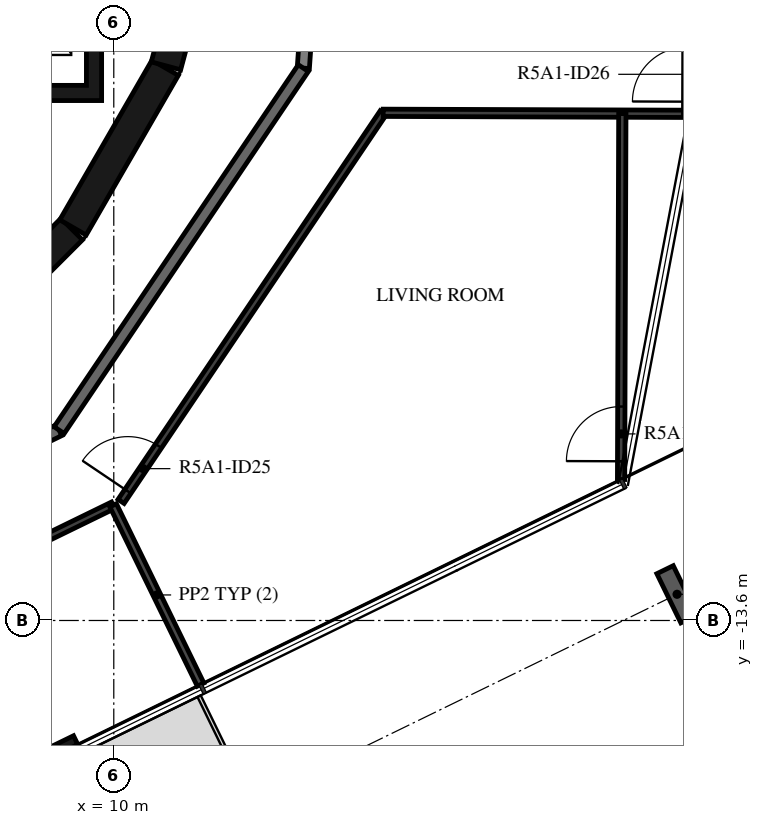
"""IFC4 building model, lengths in metres.
Left out: names, types, materials, properties, quantities, classifications, styles, units other than length and angle.
Written with IfcOpenShell. Run it as: python <this file> out.ifc"""

import sys

from ifc_helpers import new_model, si_unit, direction, frame, frame_2d, origin, origin_2d, place, context, subcontext, project, spatial, polyline, rectangle, i_section, outline, extrude, element, fill, save


model = new_model("IFC4")
c1 = context("Model", 3, precision=1e-05, world=origin(), true_north=direction((0.0, 1.0)))
c2 = subcontext(c1, "Body", "Model", "MODEL_VIEW")
j1 = project(units=[si_unit("LENGTHUNIT", "METRE"), si_unit("PLANEANGLEUNIT", "RADIAN")], contexts=[c1])
p1 = place(None, origin())
s1 = spatial("IfcSite", under=j1, at=p1, CompositionType="ELEMENT")
p2 = place(p1, origin())
s2 = spatial("IfcBuilding", under=s1, at=p2, CompositionType="ELEMENT")
p3 = place(p2, frame((0.0, 0.0, 191.9)))
s3 = spatial("IfcBuildingStorey", under=s2, at=p3, CompositionType="ELEMENT", Elevation=191.9)
p4 = place(p3, frame((19.263, -13.169, -0.38), z_axis=(0.0, 0.0, 1.0), x_axis=(-0.898794095235, -0.438371046456, 0.0)))
e1 = element("IfcColumn", 1, at=p4, inside=s3, PredefinedType="COLUMN", context=c2, shape_type="SweptSolid", body=[
    extrude(i_section(OverallWidth=0.3, OverallDepth=0.9, WebThickness=0.019, FlangeThickness=0.035, FilletRadius=0.03, at=origin_2d()), origin(), (0.0, 0.0, 1.0), 3.5),
])
p5 = place(p3, frame((6.497, -16.97, 0.0), z_axis=(0.0, 0.0, 1.0), x_axis=(0.898778711213, 0.43840258698, 0.0)))
e2 = element("IfcWall", 2, at=p5, inside=s3, PredefinedType="STANDARD", context=c2, shape_type="SweptSolid", body=[
    extrude(rectangle(XDim=3.2, YDim=0.16, at=frame_2d((1.6, 0.0))), origin(), (0.0, 0.0, 1.0), 3.12),
])
p6 = place(p5, frame((0.4, 0.0, 0.0)))
e3 = element("IfcOpeningElement", 3, at=p6, cuts=e2, PredefinedType="OPENING", context=c2, shape_type="SweptSolid", body=[
    extrude(rectangle(XDim=2.4, YDim=2.4, at=frame_2d((1.2, 1.2))), frame((0.0, 0.09, 0.0), z_axis=(0.0, -1.0, 0.0), x_axis=(1.0, 0.0, 0.0)), (0.0, 0.0, 1.0), 0.18),
])
p7 = place(p3, frame((7.164, -9.308, 0.0), z_axis=(0.0, 0.0, 1.0), x_axis=(0.707106781187, 0.707106781187, 0.0)))
e4 = element("IfcWall", 4, at=p7, inside=s3, PredefinedType="SHEAR", context=c2, shape_type="SweptSolid", body=[
    extrude(rectangle(XDim=3.032, YDim=0.5, at=frame_2d((1.516, 0.0))), origin(), (0.0, 0.0, 1.0), 3.12),
])
for number, where, z_axis, x_axis in (
    (5, (9.329, -7.137, 0.0), (0.0, 0.0, 1.0), (0.5, 0.866, 0.0)),
    (6, (10.858, -4.479, 0.0), (0.0, 0.0, 1.0), (0.259, 0.966, 0.0)),
):
    element("IfcWall", number, at=place(p3, frame(where, z_axis=z_axis, x_axis=x_axis)), inside=s3, PredefinedType="SHEAR", context=c2, shape_type="SweptSolid", body=[
        extrude(rectangle(XDim=3.033, YDim=0.5, at=frame_2d((1.516, 0.0))), origin(), (0.0, 0.0, 1.0), 3.12),
    ])
p8 = place(p3, origin())
e7 = element("IfcWall", 7, at=p8, inside=s3, PredefinedType="SHEAR", context=c2, shape_type="SweptSolid", body=[
    extrude(outline(polyline([(9.8, -5.05), (9.8, -4.8), (9.8, -1.9), (9.55, -1.9), (9.55, -4.8), (7.65, -4.8), (7.65, -1.9), (7.4, -1.9), (7.4, -4.8), (5.5, -4.8), (5.5, -1.9), (5.25, -1.9), (5.25, -4.8), (3.35, -4.8), (3.35, -1.9), (3.1, -1.9), (3.1, -4.8), (1.2, -4.8), (1.2, -1.9), (0.95, -1.9), (0.95, -4.8), (-0.95, -4.8), (-0.95, -1.9), (-1.2, -1.9), (-1.2, -4.8), (-3.1, -4.8), (-3.1, -1.9), (-3.35, -1.9), (-3.35, -4.8), (-5.25, -4.8), (-5.25, -1.9), (-5.5, -1.9), (-5.5, -4.8), (-7.4, -4.8), (-7.4, -1.9), (-7.65, -1.9), (-7.65, -4.8), (-9.55, -4.8), (-9.55, -1.9), (-9.8, -1.9), (-9.8, -4.8), (-9.8, -5.05), (9.8, -5.05)])), origin(), (0.0, 0.0, 1.0), 3.12),
])
p9 = place(p3, frame((13.117, -4.517, 0.0), z_axis=(0.0, 0.0, 1.0), x_axis=(0.069736659613, 0.997565435601, 0.0)))
e8 = element("IfcWall", 8, at=p9, inside=s3, PredefinedType="STANDARD", context=c2, shape_type="SweptSolid", body=[
    extrude(rectangle(XDim=2.654, YDim=0.2, at=frame_2d((1.327, 0.0))), origin(), (0.0, 0.0, 1.0), 3.12),
])
p10 = place(p9, frame((1.134, 0.0, 0.0)))
e9 = element("IfcOpeningElement", 9, at=p10, cuts=e8, PredefinedType="OPENING", context=c2, shape_type="SweptSolid", body=[
    extrude(rectangle(XDim=1.2, YDim=2.1, at=frame_2d((0.6, 1.05))), frame((0.0, 0.11, 0.0), z_axis=(0.0, -1.0, 0.0), x_axis=(1.0, 0.0, 0.0)), (0.0, 0.0, 1.0), 0.22),
])
p11 = place(p3, frame((2.647, -13.618, 0.0), z_axis=(0.0, 0.0, 1.0), x_axis=(0.898796543751, 0.438366026218, 0.0)))
e10 = element("IfcWall", 10, at=p11, inside=s3, PredefinedType="STANDARD", context=c2, shape_type="SweptSolid", body=[
    extrude(rectangle(XDim=7.181, YDim=0.2, at=frame_2d((3.591, 0.0))), origin(), (0.0, 0.0, 1.0), 3.12),
])
p12 = place(p11, frame((0.2, 0.0, 0.0)))
e11 = element("IfcOpeningElement", 11, at=p12, cuts=e10, PredefinedType="OPENING", context=c2, shape_type="SweptSolid", body=[
    extrude(rectangle(XDim=1.0, YDim=2.1, at=frame_2d((0.5, 1.05))), frame((0.0, 0.11, 0.0), z_axis=(0.0, -1.0, 0.0), x_axis=(1.0, 0.0, 0.0)), (0.0, 0.0, 1.0), 0.22),
])
p13 = place(p3, frame((9.101, -10.47, 0.0), z_axis=(0.0, 0.0, 1.0), x_axis=(0.559195469534, 0.829035841718, 0.0)))
e12 = element("IfcWall", 12, at=p13, inside=s3, PredefinedType="STANDARD", context=c2, shape_type="SweptSolid", body=[
    extrude(rectangle(XDim=7.181, YDim=0.2, at=frame_2d((3.591, 0.0))), origin(), (0.0, 0.0, 1.0), 3.12),
])
p14 = place(p3, frame((3.074, -15.078, 0.0), z_axis=(0.0, 0.0, 1.0), x_axis=(0.898800770739, 0.438357359377, 0.0)))
e13 = element("IfcWall", 13, at=p14, inside=s3, PredefinedType="PARTITIONING", context=c2, shape_type="SweptSolid", body=[
    extrude(rectangle(XDim=7.694, YDim=0.12, at=frame_2d((3.847, 0.0))), origin(), (0.0, 0.0, 1.0), 3.12),
])
p15 = place(p14, frame((0.2, 0.0, 0.0)))
e14 = element("IfcOpeningElement", 14, at=p15, cuts=e13, PredefinedType="OPENING", context=c2, shape_type="SweptSolid", body=[
    extrude(rectangle(XDim=0.9, YDim=2.1, at=frame_2d((0.45, 1.05))), frame((0.0, 0.07, 0.0), z_axis=(0.0, -1.0, 0.0), x_axis=(1.0, 0.0, 0.0)), (0.0, 0.0, 1.0), 0.14),
])
p16 = place(p3, frame((10.12, -11.642, 0.0), z_axis=(0.0, 0.0, 1.0), x_axis=(0.559201404667, 0.829031838362, 0.0)))
e15 = element("IfcWall", 15, at=p16, inside=s3, PredefinedType="PARTITIONING", context=c2, shape_type="SweptSolid", body=[
    extrude(rectangle(XDim=7.709, YDim=0.12, at=frame_2d((3.854, 0.0))), origin(), (0.0, 0.0, 1.0), 3.12),
])
p17 = place(p16, frame((0.2, 0.0, 0.0)))
e16 = element("IfcOpeningElement", 16, at=p17, cuts=e15, PredefinedType="OPENING", context=c2, shape_type="SweptSolid", body=[
    extrude(rectangle(XDim=0.9, YDim=2.1, at=frame_2d((0.45, 1.05))), frame((0.0, 0.07, 0.0), z_axis=(0.0, -1.0, 0.0), x_axis=(1.0, 0.0, 0.0)), (0.0, 0.0, 1.0), 0.14),
])
p18 = place(p3, frame((14.431, -5.251, 0.0), z_axis=(0.0, 0.0, 1.0), x_axis=(0.999994153659, -0.003419451456, 0.0)))
e17 = element("IfcWall", 17, at=p18, inside=s3, PredefinedType="PARTITIONING", context=c2, shape_type="SweptSolid", body=[
    extrude(rectangle(XDim=4.998, YDim=0.12, at=frame_2d((2.499, 0.0))), origin(), (0.0, 0.0, 1.0), 3.12),
])
p19 = place(p3, frame((11.427, -14.654, 0.0), z_axis=(0.0, 0.0, 1.0), x_axis=(-0.438410435857, 0.898774882677, 0.0)))
e18 = element("IfcWall", 18, at=p19, inside=s3, PredefinedType="PARTITIONING", context=c2, shape_type="SweptSolid", body=[
    extrude(rectangle(XDim=3.281, YDim=0.12, at=frame_2d((1.64, 0.0))), origin(), (0.0, 0.0, 1.0), 2.73),
])
p20 = place(p3, frame((18.343, -11.282, 0.0), z_axis=(0.0, 0.0, 1.0), x_axis=(0.003448675073, 0.999994053302, 0.0)))
e19 = element("IfcWall", 19, at=p20, inside=s3, PredefinedType="PARTITIONING", context=c2, shape_type="SweptSolid", body=[
    extrude(rectangle(XDim=6.017, YDim=0.12, at=frame_2d((3.009, 0.0))), origin(), (0.0, 0.0, 1.0), 3.12),
])
p21 = place(p20, frame((0.3, 0.0, 0.0)))
e20 = element("IfcOpeningElement", 20, at=p21, cuts=e19, PredefinedType="OPENING", context=c2, shape_type="SweptSolid", body=[
    extrude(rectangle(XDim=0.9, YDim=2.1, at=frame_2d((0.45, 1.05))), frame((0.0, 0.07, 0.0), z_axis=(0.0, -1.0, 0.0), x_axis=(1.0, 0.0, 0.0)), (0.0, 0.0, 1.0), 0.14),
])
p22 = place(p17, origin())
e21 = element("IfcDoor", 21, at=p22, inside=s3, OperationType="SINGLE_SWING_RIGHT", PredefinedType="DOOR", context=c2, shape_type="SweptSolid", body=[
    extrude(rectangle(XDim=0.9, YDim=2.1, at=frame_2d((0.45, 1.05))), frame((0.0, 0.025, 0.0), z_axis=(0.0, -1.0, 0.0), x_axis=(1.0, 0.0, 0.0)), (0.0, 0.0, 1.0), 0.05),
])
fill(e16, e21)
p23 = place(p21, origin())
e22 = element("IfcDoor", 22, at=p23, inside=s3, OperationType="SINGLE_SWING_RIGHT", PredefinedType="DOOR", context=c2, shape_type="SweptSolid", body=[
    extrude(rectangle(XDim=0.9, YDim=2.1, at=frame_2d((0.45, 1.05))), frame((0.0, 0.025, 0.0), z_axis=(0.0, -1.0, 0.0), x_axis=(1.0, 0.0, 0.0)), (0.0, 0.0, 1.0), 0.05),
])
fill(e20, e22)
save(model, sys.argv[1])
